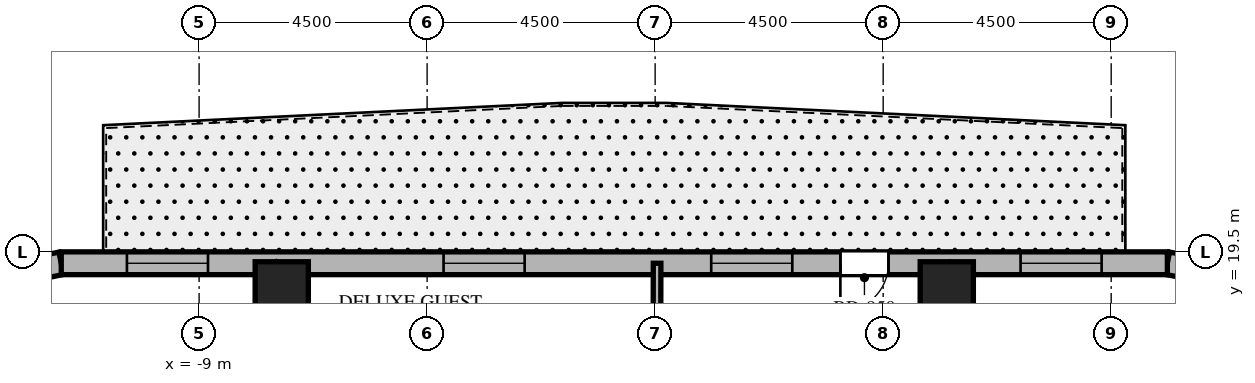
"""IFC4 building model, lengths in metres.
Left out: names, types, materials, properties, quantities, classifications, styles, units other than length and angle.
Written with IfcOpenShell. Run it as: python <this file> out.ifc"""

import sys

from ifc_helpers import new_model, si_unit, direction, frame, frame_2d, origin, origin_2d, place, context, subcontext, project, spatial, rectangle, extrude, element, fill, save


model = new_model("IFC4")
c1 = context("Model", 3, precision=1e-05, world=origin(), true_north=direction((0.0, 1.0)))
c2 = subcontext(c1, "Body", "Model", "MODEL_VIEW")
j1 = project(units=[si_unit("LENGTHUNIT", "METRE"), si_unit("PLANEANGLEUNIT", "RADIAN")], contexts=[c1])
p1 = place(None, origin())
s1 = spatial("IfcSite", under=j1, at=p1, CompositionType="ELEMENT")
p2 = place(p1, origin())
s2 = spatial("IfcBuilding", under=s1, at=p2, CompositionType="ELEMENT")
p3 = place(p2, frame((0.0, 0.0, 166.5)))
s3 = spatial("IfcBuildingStorey", under=s2, at=p3, CompositionType="ELEMENT", Elevation=166.5)
for number, where, z_axis, x_axis in (
    (1, (5.755, 18.78, 0.0), (0.0, 0.0, 1.0), (1.0, 0.0, 0.0)),
    (2, (-7.369, 18.78, 0.0), (0.0, 0.0, 1.0), (1.0, 0.0, 0.0)),
):
    element("IfcColumn", number, at=place(p3, frame(where, z_axis=z_axis, x_axis=x_axis)), inside=s3, PredefinedType="COLUMN", context=c2, shape_type="SweptSolid", body=[
        extrude(rectangle(XDim=1.05, YDim=1.05, at=origin_2d()), origin(), (0.0, 0.0, 1.0), 3.7),
    ])
p4 = place(p3, frame((11.349, 19.043, 0.0), z_axis=(0.0, 0.0, 1.0), x_axis=(-0.982931267051, 0.183973161772, 0.0)))
e3 = element("IfcWall", 3, at=p4, inside=s3, PredefinedType="SOLIDWALL", context=c2, shape_type="SweptSolid", body=[
    extrude(rectangle(XDim=1.262, YDim=0.45, at=frame_2d((0.631, 0.0))), origin(), (0.0, 0.0, 1.0), 3.38),
])
p5 = place(p3, frame((-11.72, 19.275, 0.0), z_axis=(0.0, 0.0, 1.0), x_axis=(-0.97893106758, -0.204191001093, 0.0)))
e4 = element("IfcWall", 4, at=p5, inside=s3, PredefinedType="SOLIDWALL", context=c2, shape_type="SweptSolid", body=[
    extrude(rectangle(XDim=1.4, YDim=0.45, at=frame_2d((0.7, 0.0))), origin(), (0.0, 0.0, 1.0), 3.38),
])
p6 = place(p3, frame((10.108, 19.275, 0.0), z_axis=(0.0, 0.0, 1.0), x_axis=(-1.0, 0.0, 0.0)))
e5 = element("IfcWall", 5, at=p6, inside=s3, PredefinedType="SOLIDWALL", context=c2, shape_type="SweptSolid", body=[
    extrude(rectangle(XDim=21.829, YDim=0.45, at=frame_2d((10.915, 0.0))), origin(), (0.0, 0.0, 1.0), 3.38),
])
p7 = place(p6, frame((5.503, 0.0, 0.0)))
e6 = element("IfcOpeningElement", 6, at=p7, cuts=e5, PredefinedType="OPENING", context=c2, shape_type="SweptSolid", body=[
    extrude(rectangle(XDim=0.95, YDim=2.15, at=frame_2d((0.475, 1.075))), frame((0.0, 0.235, 0.0), z_axis=(0.0, -1.0, 0.0), x_axis=(1.0, 0.0, 0.0)), (0.0, 0.0, 1.0), 0.47),
])
p8 = place(p6, frame((1.297, 0.0, 0.8)))
e7 = element("IfcOpeningElement", 7, at=p8, cuts=e5, PredefinedType="OPENING", context=c2, shape_type="SweptSolid", body=[
    extrude(rectangle(XDim=1.6, YDim=1.75, at=frame_2d((0.8, 0.875))), frame((0.0, 0.235, 0.0), z_axis=(0.0, -1.0, 0.0), x_axis=(1.0, 0.0, 0.0)), (0.0, 0.0, 1.0), 0.47),
])
p9 = place(p6, frame((7.402, 0.0, 0.8)))
e8 = element("IfcOpeningElement", 8, at=p9, cuts=e5, PredefinedType="OPENING", context=c2, shape_type="SweptSolid", body=[
    extrude(rectangle(XDim=1.6, YDim=1.75, at=frame_2d((0.8, 0.875))), frame((0.0, 0.235, 0.0), z_axis=(0.0, -1.0, 0.0), x_axis=(1.0, 0.0, 0.0)), (0.0, 0.0, 1.0), 0.47),
])
p10 = place(p6, frame((12.684, 0.0, 0.8)))
e9 = element("IfcOpeningElement", 9, at=p10, cuts=e5, PredefinedType="OPENING", context=c2, shape_type="SweptSolid", body=[
    extrude(rectangle(XDim=1.6, YDim=1.75, at=frame_2d((0.8, 0.875))), frame((0.0, 0.235, 0.0), z_axis=(0.0, -1.0, 0.0), x_axis=(1.0, 0.0, 0.0)), (0.0, 0.0, 1.0), 0.47),
])
p11 = place(p6, frame((18.933, 0.0, 0.8)))
e10 = element("IfcOpeningElement", 10, at=p11, cuts=e5, PredefinedType="OPENING", context=c2, shape_type="SweptSolid", body=[
    extrude(rectangle(XDim=1.6, YDim=1.75, at=frame_2d((0.8, 0.875))), frame((0.0, 0.235, 0.0), z_axis=(0.0, -1.0, 0.0), x_axis=(1.0, 0.0, 0.0)), (0.0, 0.0, 1.0), 0.47),
])
p12 = place(p3, frame((3.631, 11.85, 0.0), z_axis=(0.0, 0.0, 1.0), x_axis=(0.293007573338, 0.956110120209, 0.0)))
e11 = element("IfcWall", 11, at=p12, inside=s3, PredefinedType="PARTITIONING", context=c2, shape_type="SweptSolid", body=[
    extrude(rectangle(XDim=7.766, YDim=0.15, at=frame_2d((3.883, 0.0))), origin(), (0.0, 0.0, 1.0), 2.62),
])
p13 = place(p3, frame((0.024, 11.85, 0.0), z_axis=(0.0, 0.0, 1.0), x_axis=(0.001972901592, 0.999998053828, 0.0)))
e12 = element("IfcWall", 12, at=p13, inside=s3, PredefinedType="PARTITIONING", context=c2, shape_type="SweptSolid", body=[
    extrude(rectangle(XDim=7.425, YDim=0.15, at=frame_2d((3.712, 0.0))), origin(), (0.0, 0.0, 1.0), 2.62),
])
p14 = place(p3, frame((-4.65, 11.85, 0.0), z_axis=(0.0, 0.0, 1.0), x_axis=(-0.365265947993, 0.930903210456, 0.0)))
e13 = element("IfcWall", 13, at=p14, inside=s3, PredefinedType="PARTITIONING", context=c2, shape_type="SweptSolid", body=[
    extrude(rectangle(XDim=7.976, YDim=0.15, at=frame_2d((3.988, 0.0))), origin(), (0.0, 0.0, 1.0), 2.62),
])
p15 = place(p7, origin())
e14 = element("IfcDoor", 14, at=p15, inside=s3, OperationType="SINGLE_SWING_RIGHT", PredefinedType="DOOR", context=c2, shape_type="SweptSolid", body=[
    extrude(rectangle(XDim=0.95, YDim=2.15, at=frame_2d((0.475, 1.075))), frame((0.0, 0.025, 0.0), z_axis=(0.0, -1.0, 0.0), x_axis=(1.0, 0.0, 0.0)), (0.0, 0.0, 1.0), 0.05),
])
fill(e6, e14)
p16 = place(p8, origin())
e15 = element("IfcWindow", 15, at=p16, inside=s3, PartitioningType="SINGLE_PANEL", PredefinedType="WINDOW", context=c2, shape_type="SweptSolid", body=[
    extrude(rectangle(XDim=1.6, YDim=1.75, at=frame_2d((0.8, 0.875))), frame((0.0, 0.03, 0.0), z_axis=(0.0, -1.0, 0.0), x_axis=(1.0, 0.0, 0.0)), (0.0, 0.0, 1.0), 0.06),
])
fill(e7, e15)
p17 = place(p9, origin())
e16 = element("IfcWindow", 16, at=p17, inside=s3, PartitioningType="SINGLE_PANEL", PredefinedType="WINDOW", context=c2, shape_type="SweptSolid", body=[
    extrude(rectangle(XDim=1.6, YDim=1.75, at=frame_2d((0.8, 0.875))), frame((0.0, 0.03, 0.0), z_axis=(0.0, -1.0, 0.0), x_axis=(1.0, 0.0, 0.0)), (0.0, 0.0, 1.0), 0.06),
])
fill(e8, e16)
p18 = place(p10, origin())
e17 = element("IfcWindow", 17, at=p18, inside=s3, PartitioningType="SINGLE_PANEL", PredefinedType="WINDOW", context=c2, shape_type="SweptSolid", body=[
    extrude(rectangle(XDim=1.6, YDim=1.75, at=frame_2d((0.8, 0.875))), frame((0.0, 0.03, 0.0), z_axis=(0.0, -1.0, 0.0), x_axis=(1.0, 0.0, 0.0)), (0.0, 0.0, 1.0), 0.06),
])
fill(e9, e17)
p19 = place(p11, origin())
e18 = element("IfcWindow", 18, at=p19, inside=s3, PartitioningType="SINGLE_PANEL", PredefinedType="WINDOW", context=c2, shape_type="SweptSolid", body=[
    extrude(rectangle(XDim=1.6, YDim=1.75, at=frame_2d((0.8, 0.875))), frame((0.0, 0.03, 0.0), z_axis=(0.0, -1.0, 0.0), x_axis=(1.0, 0.0, 0.0)), (0.0, 0.0, 1.0), 0.06),
])
fill(e10, e18)
save(model, sys.argv[1])
